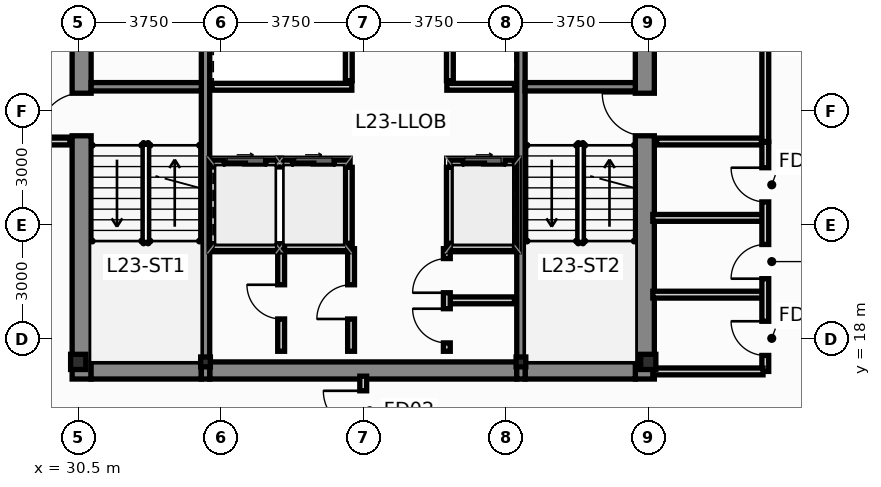
"""IFC4 building model, lengths in metres.
Left out: names, types, materials, properties, quantities, classifications, styles, units other than length and angle.
Written with IfcOpenShell. Run it as: python <this file> out.ifc"""

import sys

from ifc_helpers import new_model, si_unit, direction, frame, frame_2d, origin, origin_2d, place, context, subcontext, project, spatial, rectangle, i_section, extrude, source, transform, mapped, element, fill, save


model = new_model("IFC4")
c1 = context("Model", 3, precision=1e-05, world=origin(), true_north=direction((0.0, 1.0)))
c2 = subcontext(c1, "Body", "Model", "MODEL_VIEW")
j1 = project(units=[si_unit("LENGTHUNIT", "METRE"), si_unit("PLANEANGLEUNIT", "RADIAN")], contexts=[c1])
p1 = place(None, origin())
s1 = spatial("IfcSite", under=j1, at=p1, CompositionType="ELEMENT")
p2 = place(p1, origin())
s2 = spatial("IfcBuilding", under=s1, at=p2, CompositionType="ELEMENT")
p3 = place(p2, frame((0.0, 0.0, 90.8)))
s3 = spatial("IfcBuildingStorey", under=s2, at=p3, CompositionType="ELEMENT", Elevation=90.8)
m1 = source(origin(), c2, "Body", "SweptSolid", [
    extrude(i_section(OverallWidth=0.4, OverallDepth=0.4, WebThickness=0.02, FlangeThickness=0.032, at=origin_2d()), origin(), (0.0, 0.0, 1.0), 3.65),
])
for number, where, z_axis, x_axis in (
    (1, (30.5, 17.4, 0.0), (0.0, 0.0, 1.0), (1.0, 0.0, 0.0)),
    (2, (45.5, 17.4, 0.0), (0.0, 0.0, 1.0), (1.0, 0.0, 0.0)),
):
    element("IfcColumn", number, at=place(p3, frame(where, z_axis=z_axis, x_axis=x_axis)), inside=s3, PredefinedType="COLUMN", context=c2, shape_type="MappedRepresentation", body=[
        mapped(m1, transform((0.0, 0.0, 0.0), scale=1.0)),
    ])
m2 = source(origin(), c2, "Body", "SweptSolid", [
    extrude(i_section(OverallWidth=0.256, OverallDepth=0.26, WebThickness=0.01, FlangeThickness=0.017, at=origin_2d()), origin(), (0.0, 0.0, 1.0), 3.65),
])
for number, where, z_axis, x_axis in (
    (3, (33.85, 17.4, 0.0), (0.0, 0.0, 1.0), (1.0, 0.0, 0.0)),
    (4, (42.15, 17.4, 0.0), (0.0, 0.0, 1.0), (1.0, 0.0, 0.0)),
):
    element("IfcColumn", number, at=place(p3, frame(where, z_axis=z_axis, x_axis=x_axis)), inside=s3, PredefinedType="COLUMN", context=c2, shape_type="MappedRepresentation", body=[
        mapped(m2, transform((0.0, 0.0, 0.0), scale=1.0)),
    ])
p4 = place(p3, frame((30.59, 16.95, 0.0), z_axis=(0.0, 0.0, 1.0), x_axis=(0.0, 1.0, 0.0)))
e5 = element("IfcWall", 5, at=p4, inside=s3, PredefinedType="SHEAR", context=c2, shape_type="SweptSolid", body=[
    extrude(rectangle(XDim=13.275, YDim=0.5, at=frame_2d((6.638, 0.0))), origin(), (0.0, 0.0, 1.0), 3.65),
])
p5 = place(p4, frame((6.4, 0.0, 0.0)))
e6 = element("IfcOpeningElement", 6, at=p5, cuts=e5, PredefinedType="OPENING", context=c2, shape_type="SweptSolid", body=[
    extrude(rectangle(XDim=1.12, YDim=2.15, at=frame_2d((0.56, 1.075))), frame((0.0, 0.262, 0.0), z_axis=(0.0, -1.0, 0.0), x_axis=(1.0, 0.0, 0.0)), (0.0, 0.0, 1.0), 0.524),
])
p6 = place(p4, frame((10.85, 0.0, 0.0)))
e7 = element("IfcOpeningElement", 7, at=p6, cuts=e5, PredefinedType="OPENING", context=c2, shape_type="SweptSolid", body=[
    extrude(rectangle(XDim=1.2, YDim=2.2, at=frame_2d((0.6, 1.1))), frame((0.0, 0.262, 0.0), z_axis=(0.0, -1.0, 0.0), x_axis=(1.0, 0.0, 0.0)), (0.0, 0.0, 1.0), 0.524),
])
p7 = place(p3, frame((45.41, 16.95, 0.0), z_axis=(0.0, 0.0, 1.0), x_axis=(0.0, 1.0, 0.0)))
e8 = element("IfcWall", 8, at=p7, inside=s3, PredefinedType="SHEAR", context=c2, shape_type="SweptSolid", body=[
    extrude(rectangle(XDim=13.275, YDim=0.5, at=frame_2d((6.638, 0.0))), origin(), (0.0, 0.0, 1.0), 3.65),
])
p8 = place(p7, frame((6.4, 0.0, 0.0)))
e9 = element("IfcOpeningElement", 9, at=p8, cuts=e8, PredefinedType="OPENING", context=c2, shape_type="SweptSolid", body=[
    extrude(rectangle(XDim=1.12, YDim=2.15, at=frame_2d((0.56, 1.075))), frame((0.0, 0.262, 0.0), z_axis=(0.0, -1.0, 0.0), x_axis=(1.0, 0.0, 0.0)), (0.0, 0.0, 1.0), 0.524),
])
p9 = place(p7, frame((10.85, 0.0, 0.0)))
e10 = element("IfcOpeningElement", 10, at=p9, cuts=e8, PredefinedType="OPENING", context=c2, shape_type="SweptSolid", body=[
    extrude(rectangle(XDim=1.2, YDim=2.2, at=frame_2d((0.6, 1.1))), frame((0.0, 0.262, 0.0), z_axis=(0.0, -1.0, 0.0), x_axis=(1.0, 0.0, 0.0)), (0.0, 0.0, 1.0), 0.524),
])
p10 = place(p3, frame((30.84, 17.175, 0.0), z_axis=(0.0, 0.0, 1.0), x_axis=(1.0, 0.0, 0.0)))
e11 = element("IfcWall", 11, at=p10, inside=s3, PredefinedType="SHEAR", context=c2, shape_type="SweptSolid", body=[
    extrude(rectangle(XDim=2.9, YDim=0.45, at=frame_2d((1.45, 0.0))), origin(), (0.0, 0.0, 1.0), 3.65),
])
p11 = place(p3, frame((33.96, 17.175, 0.0), z_axis=(0.0, 0.0, 1.0), x_axis=(1.0, 0.0, 0.0)))
e12 = element("IfcWall", 12, at=p11, inside=s3, PredefinedType="SHEAR", context=c2, shape_type="SweptSolid", body=[
    extrude(rectangle(XDim=8.08, YDim=0.45, at=frame_2d((4.04, 0.0))), origin(), (0.0, 0.0, 1.0), 3.65),
])
p12 = place(p3, frame((42.26, 17.175, 0.0), z_axis=(0.0, 0.0, 1.0), x_axis=(1.0, 0.0, 0.0)))
e13 = element("IfcWall", 13, at=p12, inside=s3, PredefinedType="SHEAR", context=c2, shape_type="SweptSolid", body=[
    extrude(rectangle(XDim=2.9, YDim=0.45, at=frame_2d((1.45, 0.0))), origin(), (0.0, 0.0, 1.0), 3.65),
])
for number, where, z_axis, x_axis in (
    (14, (33.85, 16.95, 0.0), (0.0, 0.0, 1.0), (0.0, 1.0, 0.0)),
    (15, (42.15, 16.95, 0.0), (0.0, 0.0, 1.0), (0.0, 1.0, 0.0)),
):
    element("IfcWall", number, at=place(p3, frame(where, z_axis=z_axis, x_axis=x_axis)), inside=s3, PredefinedType="SHEAR", context=c2, shape_type="SweptSolid", body=[
        extrude(rectangle(XDim=13.275, YDim=0.22, at=frame_2d((6.638, 0.0))), origin(), (0.0, 0.0, 1.0), 3.65),
    ])
for number, where, z_axis, x_axis in (
    (16, (30.84, 24.64, 0.0), (0.0, 0.0, 1.0), (1.0, 0.0, 0.0)),
    (17, (42.26, 24.64, 0.0), (0.0, 0.0, 1.0), (1.0, 0.0, 0.0)),
):
    element("IfcWall", number, at=place(p3, frame(where, z_axis=z_axis, x_axis=x_axis)), inside=s3, PredefinedType="SHEAR", context=c2, shape_type="SweptSolid", body=[
        extrude(rectangle(XDim=2.9, YDim=0.22, at=frame_2d((1.45, 0.0))), origin(), (0.0, 0.0, 1.0), 3.65),
    ])
p13 = place(p3, frame((34.02, 22.62, 0.0), z_axis=(0.0, 0.0, 1.0), x_axis=(1.0, 0.0, 0.0)))
e18 = element("IfcWall", 18, at=p13, inside=s3, PredefinedType="PARTITIONING", context=c2, shape_type="SweptSolid", body=[
    extrude(rectangle(XDim=3.6, YDim=0.18, at=frame_2d((1.8, 0.0))), origin(), (0.0, 0.0, 1.0), 3.4),
])
p14 = place(p13, frame((0.32, 0.0, 0.0)))
e19 = element("IfcOpeningElement", 19, at=p14, cuts=e18, PredefinedType="OPENING", context=c2, shape_type="SweptSolid", body=[
    extrude(rectangle(XDim=1.1, YDim=2.2, at=frame_2d((0.55, 1.1))), frame((0.0, 0.102, 0.0), z_axis=(0.0, -1.0, 0.0), x_axis=(1.0, 0.0, 0.0)), (0.0, 0.0, 1.0), 0.204),
])
p15 = place(p13, frame((2.12, 0.0, 0.0)))
e20 = element("IfcOpeningElement", 20, at=p15, cuts=e18, PredefinedType="OPENING", context=c2, shape_type="SweptSolid", body=[
    extrude(rectangle(XDim=1.1, YDim=2.2, at=frame_2d((0.55, 1.1))), frame((0.0, 0.102, 0.0), z_axis=(0.0, -1.0, 0.0), x_axis=(1.0, 0.0, 0.0)), (0.0, 0.0, 1.0), 0.204),
])
p16 = place(p3, frame((40.28, 22.62, 0.0), z_axis=(0.0, 0.0, 1.0), x_axis=(1.0, 0.0, 0.0)))
e21 = element("IfcWall", 21, at=p16, inside=s3, PredefinedType="PARTITIONING", context=c2, shape_type="SweptSolid", body=[
    extrude(rectangle(XDim=1.7, YDim=0.18, at=frame_2d((0.85, 0.0))), origin(), (0.0, 0.0, 1.0), 3.4),
])
p17 = place(p16, frame((0.35, 0.0, 0.0)))
e22 = element("IfcOpeningElement", 22, at=p17, cuts=e21, PredefinedType="OPENING", context=c2, shape_type="SweptSolid", body=[
    extrude(rectangle(XDim=1.1, YDim=2.2, at=frame_2d((0.55, 1.1))), frame((0.0, 0.102, 0.0), z_axis=(0.0, -1.0, 0.0), x_axis=(1.0, 0.0, 0.0)), (0.0, 0.0, 1.0), 0.204),
])
for number, where, z_axis, x_axis in (
    (23, (37.62, 20.52, 0.0), (0.0, 0.0, 1.0), (0.0, 1.0, 0.0)),
    (24, (40.28, 20.52, 0.0), (0.0, 0.0, 1.0), (0.0, 1.0, 0.0)),
    (25, (37.62, 24.8, 0.0), (0.0, 0.0, 1.0), (0.0, 1.0, 0.0)),
    (26, (40.28, 24.8, 0.0), (0.0, 0.0, 1.0), (0.0, 1.0, 0.0)),
):
    element("IfcWall", number, at=place(p3, frame(where, z_axis=z_axis, x_axis=x_axis)), inside=s3, PredefinedType="PARTITIONING", context=c2, shape_type="SweptSolid", body=[
        extrude(rectangle(XDim=2.0, YDim=0.18, at=frame_2d((1.0, 0.0))), origin(), (0.0, 0.0, 1.0), 3.4),
    ])
p18 = place(p3, frame((34.02, 24.64, 0.0), z_axis=(0.0, 0.0, 1.0), x_axis=(1.0, 0.0, 0.0)))
e27 = element("IfcWall", 27, at=p18, inside=s3, PredefinedType="PARTITIONING", context=c2, shape_type="SweptSolid", body=[
    extrude(rectangle(XDim=3.68, YDim=0.18, at=frame_2d((1.84, 0.0))), origin(), (0.0, 0.0, 1.0), 3.4),
])
p19 = place(p3, frame((40.2, 24.64, 0.0), z_axis=(0.0, 0.0, 1.0), x_axis=(1.0, 0.0, 0.0)))
e28 = element("IfcWall", 28, at=p19, inside=s3, PredefinedType="PARTITIONING", context=c2, shape_type="SweptSolid", body=[
    extrude(rectangle(XDim=1.78, YDim=0.18, at=frame_2d((0.89, 0.0))), origin(), (0.0, 0.0, 1.0), 3.4),
])
p20 = place(p3, frame((27.52, 23.2, 0.0), z_axis=(0.0, 0.0, 1.0), x_axis=(1.0, 0.0, 0.0)))
e29 = element("IfcWall", 29, at=p20, inside=s3, PredefinedType="PARTITIONING", context=c2, shape_type="SweptSolid", body=[
    extrude(rectangle(XDim=2.76, YDim=0.18, at=frame_2d((1.38, 0.0))), origin(), (0.0, 0.0, 1.0), 3.4),
])
p21 = place(p3, frame((48.58, 23.2, 0.0), z_axis=(0.0, 0.0, 1.0), x_axis=(0.0, 1.0, 0.0)))
e30 = element("IfcWall", 30, at=p21, inside=s3, PredefinedType="PARTITIONING", context=c2, shape_type="SweptSolid", body=[
    extrude(rectangle(XDim=6.4, YDim=0.18, at=frame_2d((3.2, 0.0))), origin(), (0.0, 0.0, 1.0), 3.026),
])
p22 = place(p21, frame((2.65, 0.0, 0.0)))
e31 = element("IfcOpeningElement", 31, at=p22, cuts=e30, PredefinedType="OPENING", context=c2, shape_type="SweptSolid", body=[
    extrude(rectangle(XDim=1.05, YDim=2.15, at=frame_2d((0.525, 1.075))), frame((0.0, 0.102, 0.0), z_axis=(0.0, -1.0, 0.0), x_axis=(1.0, 0.0, 0.0)), (0.0, 0.0, 1.0), 0.204),
])
p23 = place(p3, frame((45.72, 23.2, 0.0), z_axis=(0.0, 0.0, 1.0), x_axis=(1.0, 0.0, 0.0)))
e32 = element("IfcWall", 32, at=p23, inside=s3, PredefinedType="PARTITIONING", context=c2, shape_type="SweptSolid", body=[
    extrude(rectangle(XDim=2.76, YDim=0.18, at=frame_2d((1.38, 0.0))), origin(), (0.0, 0.0, 1.0), 3.4),
])
p24 = place(p3, frame((34.02, 20.42, 0.0), z_axis=(0.0, 0.0, 1.0), x_axis=(1.0, 0.0, 0.0)))
e33 = element("IfcWall", 33, at=p24, inside=s3, PredefinedType="PARTITIONING", context=c2, shape_type="SweptSolid", body=[
    extrude(rectangle(XDim=3.64, YDim=0.18, at=frame_2d((1.82, 0.0))), origin(), (0.0, 0.0, 1.0), 3.4),
])
p25 = place(p3, frame((40.22, 20.42, 0.0), z_axis=(0.0, 0.0, 1.0), x_axis=(1.0, 0.0, 0.0)))
e34 = element("IfcWall", 34, at=p25, inside=s3, PredefinedType="PARTITIONING", context=c2, shape_type="SweptSolid", body=[
    extrude(rectangle(XDim=1.76, YDim=0.18, at=frame_2d((0.88, 0.0))), origin(), (0.0, 0.0, 1.0), 3.4),
])
p26 = place(p3, frame((35.84, 17.68, 0.0), z_axis=(0.0, 0.0, 1.0), x_axis=(0.0, 1.0, 0.0)))
e35 = element("IfcWall", 35, at=p26, inside=s3, PredefinedType="PARTITIONING", context=c2, shape_type="SweptSolid", body=[
    extrude(rectangle(XDim=2.7, YDim=0.18, at=frame_2d((1.35, 0.0))), origin(), (0.0, 0.0, 1.0), 3.4),
])
p27 = place(p26, frame((0.85, 0.0, 0.0)))
e36 = element("IfcOpeningElement", 36, at=p27, cuts=e35, PredefinedType="OPENING", context=c2, shape_type="SweptSolid", body=[
    extrude(rectangle(XDim=0.9, YDim=2.1, at=frame_2d((0.45, 1.05))), frame((0.0, 0.102, 0.0), z_axis=(0.0, -1.0, 0.0), x_axis=(1.0, 0.0, 0.0)), (0.0, 0.0, 1.0), 0.204),
])
p28 = place(p3, frame((37.68, 17.68, 0.0), z_axis=(0.0, 0.0, 1.0), x_axis=(0.0, 1.0, 0.0)))
e37 = element("IfcWall", 37, at=p28, inside=s3, PredefinedType="PARTITIONING", context=c2, shape_type="SweptSolid", body=[
    extrude(rectangle(XDim=2.7, YDim=0.18, at=frame_2d((1.35, 0.0))), origin(), (0.0, 0.0, 1.0), 3.4),
])
p29 = place(p28, frame((0.85, 0.0, 0.0)))
e38 = element("IfcOpeningElement", 38, at=p29, cuts=e37, PredefinedType="OPENING", context=c2, shape_type="SweptSolid", body=[
    extrude(rectangle(XDim=0.9, YDim=2.1, at=frame_2d((0.45, 1.05))), frame((0.0, 0.102, 0.0), z_axis=(0.0, -1.0, 0.0), x_axis=(1.0, 0.0, 0.0)), (0.0, 0.0, 1.0), 0.204),
])
p30 = place(p3, frame((40.28, 19.02, 0.0), z_axis=(0.0, 0.0, 1.0), x_axis=(1.0, 0.0, 0.0)))
e39 = element("IfcWall", 39, at=p30, inside=s3, PredefinedType="PARTITIONING", context=c2, shape_type="SweptSolid", body=[
    extrude(rectangle(XDim=1.7, YDim=0.18, at=frame_2d((0.85, 0.0))), origin(), (0.0, 0.0, 1.0), 3.4),
])
p31 = place(p3, frame((40.2, 17.68, 0.0), z_axis=(0.0, 0.0, 1.0), x_axis=(0.0, 1.0, 0.0)))
e40 = element("IfcWall", 40, at=p31, inside=s3, PredefinedType="PARTITIONING", context=c2, shape_type="SweptSolid", body=[
    extrude(rectangle(XDim=2.7, YDim=0.18, at=frame_2d((1.35, 0.0))), origin(), (0.0, 0.0, 1.0), 3.4),
])
p32 = place(p31, frame((0.22, 0.0, 0.0)))
e41 = element("IfcOpeningElement", 41, at=p32, cuts=e40, PredefinedType="OPENING", context=c2, shape_type="SweptSolid", body=[
    extrude(rectangle(XDim=0.9, YDim=2.1, at=frame_2d((0.45, 1.05))), frame((0.0, 0.102, 0.0), z_axis=(0.0, -1.0, 0.0), x_axis=(1.0, 0.0, 0.0)), (0.0, 0.0, 1.0), 0.204),
])
p33 = place(p31, frame((1.54, 0.0, 0.0)))
e42 = element("IfcOpeningElement", 42, at=p33, cuts=e40, PredefinedType="OPENING", context=c2, shape_type="SweptSolid", body=[
    extrude(rectangle(XDim=0.9, YDim=2.1, at=frame_2d((0.45, 1.05))), frame((0.0, 0.102, 0.0), z_axis=(0.0, -1.0, 0.0), x_axis=(1.0, 0.0, 0.0)), (0.0, 0.0, 1.0), 0.204),
])
for number, where, z_axis, x_axis in (
    (43, (45.62, 19.17, 0.0), (0.0, 0.0, 1.0), (1.0, 0.0, 0.0)),
    (44, (45.62, 21.19, 0.0), (0.0, 0.0, 1.0), (1.0, 0.0, 0.0)),
):
    element("IfcWall", number, at=place(p3, frame(where, z_axis=z_axis, x_axis=x_axis)), inside=s3, PredefinedType="PARTITIONING", context=c2, shape_type="SweptSolid", body=[
        extrude(rectangle(XDim=2.9, YDim=0.18, at=frame_2d((1.45, 0.0))), origin(), (0.0, 0.0, 1.0), 3.4),
    ])
p34 = place(p3, frame((48.58, 17.15, 0.0), z_axis=(0.0, 0.0, 1.0), x_axis=(0.0, 1.0, 0.0)))
e45 = element("IfcWall", 45, at=p34, inside=s3, PredefinedType="PARTITIONING", context=c2, shape_type="SweptSolid", body=[
    extrude(rectangle(XDim=6.03, YDim=0.18, at=frame_2d((3.015, 0.0))), origin(), (0.0, 0.0, 1.0), 3.4),
])
p35 = place(p34, frame((0.42, 0.0, 0.0)))
e46 = element("IfcOpeningElement", 46, at=p35, cuts=e45, PredefinedType="OPENING", context=c2, shape_type="SweptSolid", body=[
    extrude(rectangle(XDim=0.9, YDim=2.1, at=frame_2d((0.45, 1.05))), frame((0.0, 0.102, 0.0), z_axis=(0.0, -1.0, 0.0), x_axis=(1.0, 0.0, 0.0)), (0.0, 0.0, 1.0), 0.204),
])
p36 = place(p34, frame((2.44, 0.0, 0.0)))
e47 = element("IfcOpeningElement", 47, at=p36, cuts=e45, PredefinedType="OPENING", context=c2, shape_type="SweptSolid", body=[
    extrude(rectangle(XDim=0.9, YDim=2.1, at=frame_2d((0.45, 1.05))), frame((0.0, 0.102, 0.0), z_axis=(0.0, -1.0, 0.0), x_axis=(1.0, 0.0, 0.0)), (0.0, 0.0, 1.0), 0.204),
])
p37 = place(p34, frame((4.46, 0.0, 0.0)))
e48 = element("IfcOpeningElement", 48, at=p37, cuts=e45, PredefinedType="OPENING", context=c2, shape_type="SweptSolid", body=[
    extrude(rectangle(XDim=0.9, YDim=2.1, at=frame_2d((0.45, 1.05))), frame((0.0, 0.102, 0.0), z_axis=(0.0, -1.0, 0.0), x_axis=(1.0, 0.0, 0.0)), (0.0, 0.0, 1.0), 0.204),
])
p38 = place(p3, frame((45.62, 17.15, 0.0), z_axis=(0.0, 0.0, 1.0), x_axis=(1.0, 0.0, 0.0)))
e49 = element("IfcWall", 49, at=p38, inside=s3, PredefinedType="PARTITIONING", context=c2, shape_type="SweptSolid", body=[
    extrude(rectangle(XDim=2.9, YDim=0.18, at=frame_2d((1.45, 0.0))), origin(), (0.0, 0.0, 1.0), 2.783),
])
p39 = place(p3, frame((38.0, 15.205, 0.0), z_axis=(0.0, 0.0, 1.0), x_axis=(0.0, 1.0, 0.0)))
e50 = element("IfcWall", 50, at=p39, inside=s3, PredefinedType="PARTITIONING", context=c2, shape_type="SweptSolid", body=[
    extrude(rectangle(XDim=1.82, YDim=0.18, at=frame_2d((0.91, 0.0))), origin(), (0.0, 0.0, 1.0), 3.4),
])
p40 = place(p39, frame((0.385, 0.0, 0.0)))
e51 = element("IfcOpeningElement", 51, at=p40, cuts=e50, PredefinedType="OPENING", context=c2, shape_type="SweptSolid", body=[
    extrude(rectangle(XDim=1.05, YDim=2.15, at=frame_2d((0.525, 1.075))), frame((0.0, 0.102, 0.0), z_axis=(0.0, -1.0, 0.0), x_axis=(1.0, 0.0, 0.0)), (0.0, 0.0, 1.0), 0.204),
])
p41 = place(p5, origin())
e52 = element("IfcDoor", 52, at=p41, inside=s3, OperationType="SINGLE_SWING_LEFT", PredefinedType="DOOR", context=c2, shape_type="SweptSolid", body=[
    extrude(rectangle(XDim=1.12, YDim=2.15, at=frame_2d((0.56, 1.075))), frame((0.0, 0.025, 0.0), z_axis=(0.0, -1.0, 0.0), x_axis=(1.0, 0.0, 0.0)), (0.0, 0.0, 1.0), 0.05),
])
fill(e6, e52)
p42 = place(p8, origin())
e53 = element("IfcDoor", 53, at=p42, inside=s3, OperationType="SINGLE_SWING_RIGHT", PredefinedType="DOOR", context=c2, shape_type="SweptSolid", body=[
    extrude(rectangle(XDim=1.12, YDim=2.15, at=frame_2d((0.56, 1.075))), frame((0.0, 0.025, 0.0), z_axis=(0.0, -1.0, 0.0), x_axis=(1.0, 0.0, 0.0)), (0.0, 0.0, 1.0), 0.05),
])
fill(e9, e53)
p43 = place(p14, origin())
e54 = element("IfcDoor", 54, at=p43, inside=s3, OperationType="SLIDING_TO_LEFT", PredefinedType="DOOR", context=c2, shape_type="SweptSolid", body=[
    extrude(rectangle(XDim=1.1, YDim=2.2, at=frame_2d((0.55, 1.1))), frame((0.0, 0.025, 0.0), z_axis=(0.0, -1.0, 0.0), x_axis=(1.0, 0.0, 0.0)), (0.0, 0.0, 1.0), 0.05),
])
fill(e19, e54)
p44 = place(p15, origin())
e55 = element("IfcDoor", 55, at=p44, inside=s3, OperationType="SLIDING_TO_RIGHT", PredefinedType="DOOR", context=c2, shape_type="SweptSolid", body=[
    extrude(rectangle(XDim=1.1, YDim=2.2, at=frame_2d((0.55, 1.1))), frame((0.0, 0.025, 0.0), z_axis=(0.0, -1.0, 0.0), x_axis=(1.0, 0.0, 0.0)), (0.0, 0.0, 1.0), 0.05),
])
fill(e20, e55)
p45 = place(p17, origin())
e56 = element("IfcDoor", 56, at=p45, inside=s3, OperationType="SLIDING_TO_LEFT", PredefinedType="DOOR", context=c2, shape_type="SweptSolid", body=[
    extrude(rectangle(XDim=1.1, YDim=2.2, at=frame_2d((0.55, 1.1))), frame((0.0, 0.025, 0.0), z_axis=(0.0, -1.0, 0.0), x_axis=(1.0, 0.0, 0.0)), (0.0, 0.0, 1.0), 0.05),
])
fill(e22, e56)
p46 = place(p27, origin())
e57 = element("IfcDoor", 57, at=p46, inside=s3, OperationType="SINGLE_SWING_RIGHT", PredefinedType="DOOR", context=c2, shape_type="SweptSolid", body=[
    extrude(rectangle(XDim=0.9, YDim=2.1, at=frame_2d((0.45, 1.05))), frame((0.0, 0.025, 0.0), z_axis=(0.0, -1.0, 0.0), x_axis=(1.0, 0.0, 0.0)), (0.0, 0.0, 1.0), 0.05),
])
fill(e36, e57)
p47 = place(p29, origin())
e58 = element("IfcDoor", 58, at=p47, inside=s3, OperationType="SINGLE_SWING_LEFT", PredefinedType="DOOR", context=c2, shape_type="SweptSolid", body=[
    extrude(rectangle(XDim=0.9, YDim=2.1, at=frame_2d((0.45, 1.05))), frame((0.0, 0.025, 0.0), z_axis=(0.0, -1.0, 0.0), x_axis=(1.0, 0.0, 0.0)), (0.0, 0.0, 1.0), 0.05),
])
fill(e38, e58)
p48 = place(p32, origin())
e59 = element("IfcDoor", 59, at=p48, inside=s3, OperationType="SINGLE_SWING_RIGHT", PredefinedType="DOOR", context=c2, shape_type="SweptSolid", body=[
    extrude(rectangle(XDim=0.9, YDim=2.1, at=frame_2d((0.45, 1.05))), frame((0.0, 0.025, 0.0), z_axis=(0.0, -1.0, 0.0), x_axis=(1.0, 0.0, 0.0)), (0.0, 0.0, 1.0), 0.05),
])
fill(e41, e59)
p49 = place(p33, origin())
e60 = element("IfcDoor", 60, at=p49, inside=s3, OperationType="SINGLE_SWING_LEFT", PredefinedType="DOOR", context=c2, shape_type="SweptSolid", body=[
    extrude(rectangle(XDim=0.9, YDim=2.1, at=frame_2d((0.45, 1.05))), frame((0.0, 0.025, 0.0), z_axis=(0.0, -1.0, 0.0), x_axis=(1.0, 0.0, 0.0)), (0.0, 0.0, 1.0), 0.05),
])
fill(e42, e60)
p50 = place(p35, origin())
e61 = element("IfcDoor", 61, at=p50, inside=s3, OperationType="SINGLE_SWING_RIGHT", PredefinedType="DOOR", context=c2, shape_type="SweptSolid", body=[
    extrude(rectangle(XDim=0.9, YDim=2.1, at=frame_2d((0.45, 1.05))), frame((0.0, 0.025, 0.0), z_axis=(0.0, -1.0, 0.0), x_axis=(1.0, 0.0, 0.0)), (0.0, 0.0, 1.0), 0.05),
])
fill(e46, e61)
p51 = place(p36, origin())
e62 = element("IfcDoor", 62, at=p51, inside=s3, OperationType="SINGLE_SWING_LEFT", PredefinedType="DOOR", context=c2, shape_type="SweptSolid", body=[
    extrude(rectangle(XDim=0.9, YDim=2.1, at=frame_2d((0.45, 1.05))), frame((0.0, 0.025, 0.0), z_axis=(0.0, -1.0, 0.0), x_axis=(1.0, 0.0, 0.0)), (0.0, 0.0, 1.0), 0.05),
])
fill(e47, e62)
p52 = place(p37, origin())
e63 = element("IfcDoor", 63, at=p52, inside=s3, OperationType="SINGLE_SWING_RIGHT", PredefinedType="DOOR", context=c2, shape_type="SweptSolid", body=[
    extrude(rectangle(XDim=0.9, YDim=2.1, at=frame_2d((0.45, 1.05))), frame((0.0, 0.025, 0.0), z_axis=(0.0, -1.0, 0.0), x_axis=(1.0, 0.0, 0.0)), (0.0, 0.0, 1.0), 0.05),
])
fill(e48, e63)
p53 = place(p40, origin())
e64 = element("IfcDoor", 64, at=p53, inside=s3, OperationType="SINGLE_SWING_RIGHT", PredefinedType="DOOR", context=c2, shape_type="SweptSolid", body=[
    extrude(rectangle(XDim=1.05, YDim=2.15, at=frame_2d((0.525, 1.075))), frame((0.0, 0.025, 0.0), z_axis=(0.0, -1.0, 0.0), x_axis=(1.0, 0.0, 0.0)), (0.0, 0.0, 1.0), 0.05),
])
fill(e51, e64)
save(model, sys.argv[1])
